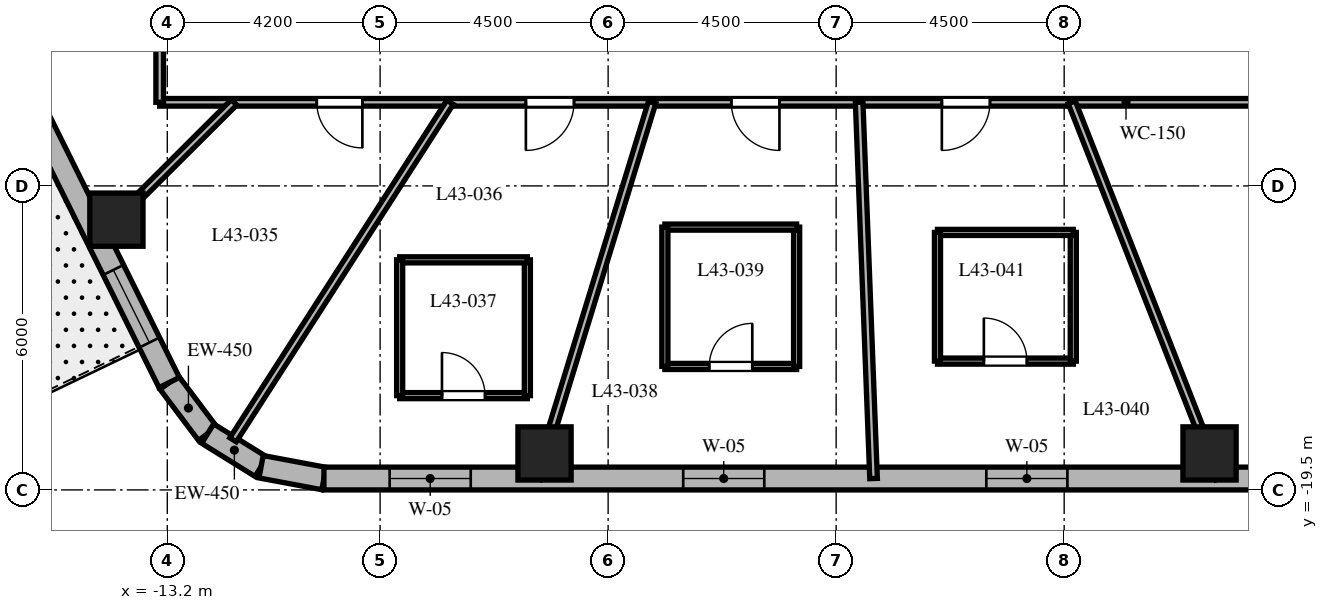
"""IFC4 building model, lengths in metres.
Left out: names, types, materials, properties, quantities, classifications, styles, units other than length and angle.
Written with IfcOpenShell. Run it as: python <this file> out.ifc"""

import sys

from ifc_helpers import new_model, si_unit, direction, frame, frame_2d, origin, origin_2d, place, context, subcontext, project, spatial, rectangle, extrude, element, fill, save


model = new_model("IFC4")
c1 = context("Model", 3, precision=1e-05, world=origin(), true_north=direction((0.0, 1.0)))
c2 = subcontext(c1, "Body", "Model", "MODEL_VIEW")
j1 = project(units=[si_unit("LENGTHUNIT", "METRE"), si_unit("PLANEANGLEUNIT", "RADIAN")], contexts=[c1])
p1 = place(None, origin())
s1 = spatial("IfcSite", under=j1, at=p1, CompositionType="ELEMENT")
p2 = place(p1, origin())
s2 = spatial("IfcBuilding", under=s1, at=p2, CompositionType="ELEMENT")
p3 = place(p2, frame((0.0, 0.0, 175.6)))
s3 = spatial("IfcBuildingStorey", under=s2, at=p3, CompositionType="ELEMENT", Elevation=175.6)
for number, where, z_axis, x_axis in (
    (1, (-5.755, -18.78, 0.0), (0.0, 0.0, 1.0), (1.0, 0.0, 0.0)),
    (2, (7.369, -18.78, 0.0), (0.0, 0.0, 1.0), (1.0, 0.0, 0.0)),
    (3, (-14.204, -14.166, 0.0), (0.0, 0.0, 1.0), (1.0, 0.0, 0.0)),
):
    element("IfcColumn", number, at=place(p3, frame(where, z_axis=z_axis, x_axis=x_axis)), inside=s3, PredefinedType="COLUMN", context=c2, shape_type="SweptSolid", body=[
        extrude(rectangle(XDim=1.05, YDim=1.05, at=origin_2d()), origin(), (0.0, 0.0, 1.0), 3.7),
    ])
p4 = place(p3, frame((-13.162, -17.381, 0.0), z_axis=(0.0, 0.0, 1.0), x_axis=(0.601515770517, -0.798860925205, 0.0)))
e4 = element("IfcWall", 4, at=p4, inside=s3, PredefinedType="SOLIDWALL", context=c2, shape_type="SweptSolid", body=[
    extrude(rectangle(XDim=1.262, YDim=0.45, at=frame_2d((0.631, 0.0))), origin(), (0.0, 0.0, 1.0), 3.4),
])
p5 = place(p3, frame((-12.403, -18.389, 0.0), z_axis=(0.0, 0.0, 1.0), x_axis=(0.849795170926, -0.527113049991, 0.0)))
e5 = element("IfcWall", 5, at=p5, inside=s3, PredefinedType="SOLIDWALL", context=c2, shape_type="SweptSolid", body=[
    extrude(rectangle(XDim=1.241, YDim=0.45, at=frame_2d((0.62, 0.0))), origin(), (0.0, 0.0, 1.0), 3.4),
])
p6 = place(p3, frame((-11.349, -19.043, 0.0), z_axis=(0.0, 0.0, 1.0), x_axis=(0.982931267051, -0.183973161772, 0.0)))
e6 = element("IfcWall", 6, at=p6, inside=s3, PredefinedType="SOLIDWALL", context=c2, shape_type="SweptSolid", body=[
    extrude(rectangle(XDim=1.262, YDim=0.45, at=frame_2d((0.631, 0.0))), origin(), (0.0, 0.0, 1.0), 3.4),
])
p7 = place(p3, frame((-10.108, -19.275, 0.0), z_axis=(0.0, 0.0, 1.0), x_axis=(1.0, 0.0, 0.0)))
e7 = element("IfcWall", 7, at=p7, inside=s3, PredefinedType="SOLIDWALL", context=c2, shape_type="SweptSolid", body=[
    extrude(rectangle(XDim=21.829, YDim=0.45, at=frame_2d((10.915, 0.0))), origin(), (0.0, 0.0, 1.0), 3.4),
])
p8 = place(p7, frame((1.297, 0.0, 0.8)))
e8 = element("IfcOpeningElement", 8, at=p8, cuts=e7, PredefinedType="OPENING", context=c2, shape_type="SweptSolid", body=[
    extrude(rectangle(XDim=1.6, YDim=1.75, at=frame_2d((0.8, 0.875))), frame((0.0, 0.235, 0.0), z_axis=(0.0, -1.0, 0.0), x_axis=(1.0, 0.0, 0.0)), (0.0, 0.0, 1.0), 0.47),
])
p9 = place(p7, frame((7.09, 0.0, 0.8)))
e9 = element("IfcOpeningElement", 9, at=p9, cuts=e7, PredefinedType="OPENING", context=c2, shape_type="SweptSolid", body=[
    extrude(rectangle(XDim=1.6, YDim=1.75, at=frame_2d((0.8, 0.875))), frame((0.0, 0.235, 0.0), z_axis=(0.0, -1.0, 0.0), x_axis=(1.0, 0.0, 0.0)), (0.0, 0.0, 1.0), 0.47),
])
p10 = place(p7, frame((13.072, 0.0, 0.8)))
e10 = element("IfcOpeningElement", 10, at=p10, cuts=e7, PredefinedType="OPENING", context=c2, shape_type="SweptSolid", body=[
    extrude(rectangle(XDim=1.6, YDim=1.75, at=frame_2d((0.8, 0.875))), frame((0.0, 0.235, 0.0), z_axis=(0.0, -1.0, 0.0), x_axis=(1.0, 0.0, 0.0)), (0.0, 0.0, 1.0), 0.47),
])
p11 = place(p7, frame((18.933, 0.0, 0.8)))
e11 = element("IfcOpeningElement", 11, at=p11, cuts=e7, PredefinedType="OPENING", context=c2, shape_type="SweptSolid", body=[
    extrude(rectangle(XDim=1.6, YDim=1.75, at=frame_2d((0.8, 0.875))), frame((0.0, 0.235, 0.0), z_axis=(0.0, -1.0, 0.0), x_axis=(1.0, 0.0, 0.0)), (0.0, 0.0, 1.0), 0.47),
])
p12 = place(p3, frame((-20.618, -2.344, 0.0), z_axis=(0.0, 0.0, 1.0), x_axis=(0.444243691097, -0.895905990002, 0.0)))
e12 = element("IfcWall", 12, at=p12, inside=s3, PredefinedType="SOLIDWALL", context=c2, shape_type="SweptSolid", body=[
    extrude(rectangle(XDim=16.784, YDim=0.45, at=frame_2d((8.392, 0.0))), origin(), (0.0, 0.0, 1.0), 3.4),
])
p13 = place(p12, frame((4.535, 0.0, 0.0)))
e13 = element("IfcOpeningElement", 13, at=p13, cuts=e12, PredefinedType="OPENING", context=c2, shape_type="SweptSolid", body=[
    extrude(rectangle(XDim=0.95, YDim=2.15, at=frame_2d((0.475, 1.075))), frame((0.0, 0.235, 0.0), z_axis=(0.0, -1.0, 0.0), x_axis=(1.0, 0.0, 0.0)), (0.0, 0.0, 1.0), 0.47),
])
p14 = place(p12, frame((0.931, 0.0, 0.8)))
e14 = element("IfcOpeningElement", 14, at=p14, cuts=e12, PredefinedType="OPENING", context=c2, shape_type="SweptSolid", body=[
    extrude(rectangle(XDim=1.6, YDim=1.75, at=frame_2d((0.8, 0.875))), frame((0.0, 0.235, 0.0), z_axis=(0.0, -1.0, 0.0), x_axis=(1.0, 0.0, 0.0)), (0.0, 0.0, 1.0), 0.47),
])
p15 = place(p12, frame((7.642, 0.0, 0.8)))
e15 = element("IfcOpeningElement", 15, at=p15, cuts=e12, PredefinedType="OPENING", context=c2, shape_type="SweptSolid", body=[
    extrude(rectangle(XDim=1.6, YDim=1.75, at=frame_2d((0.8, 0.875))), frame((0.0, 0.235, 0.0), z_axis=(0.0, -1.0, 0.0), x_axis=(1.0, 0.0, 0.0)), (0.0, 0.0, 1.0), 0.47),
])
p16 = place(p12, frame((14.303, 0.0, 0.8)))
e16 = element("IfcOpeningElement", 16, at=p16, cuts=e12, PredefinedType="OPENING", context=c2, shape_type="SweptSolid", body=[
    extrude(rectangle(XDim=1.6, YDim=1.75, at=frame_2d((0.8, 0.875))), frame((0.0, 0.235, 0.0), z_axis=(0.0, -1.0, 0.0), x_axis=(1.0, 0.0, 0.0)), (0.0, 0.0, 1.0), 0.47),
])
p17 = place(p3, frame((13.35, -11.85, 0.0), z_axis=(0.0, 0.0, 1.0), x_axis=(-1.0, 0.0, 0.0)))
e17 = element("IfcWall", 17, at=p17, inside=s3, PredefinedType="PARTITIONING", context=c2, shape_type="SweptSolid", body=[
    extrude(rectangle(XDim=26.7, YDim=0.15, at=frame_2d((13.35, 0.0))), origin(), (0.0, 0.0, 1.0), 2.84),
])
p18 = place(p17, frame((22.7, 0.0, 0.0)))
e18 = element("IfcOpeningElement", 18, at=p18, cuts=e17, PredefinedType="OPENING", context=c2, shape_type="SweptSolid", body=[
    extrude(rectangle(XDim=0.9, YDim=2.03, at=frame_2d((0.45, 1.015))), frame((0.0, 0.085, 0.0), z_axis=(0.0, -1.0, 0.0), x_axis=(1.0, 0.0, 0.0)), (0.0, 0.0, 1.0), 0.17),
])
p19 = place(p17, frame((18.523, 0.0, 0.0)))
e19 = element("IfcOpeningElement", 19, at=p19, cuts=e17, PredefinedType="OPENING", context=c2, shape_type="SweptSolid", body=[
    extrude(rectangle(XDim=0.95, YDim=2.03, at=frame_2d((0.475, 1.015))), frame((0.0, 0.085, 0.0), z_axis=(0.0, -1.0, 0.0), x_axis=(1.0, 0.0, 0.0)), (0.0, 0.0, 1.0), 0.17),
])
p20 = place(p17, frame((14.469, 0.0, 0.0)))
e20 = element("IfcOpeningElement", 20, at=p20, cuts=e17, PredefinedType="OPENING", context=c2, shape_type="SweptSolid", body=[
    extrude(rectangle(XDim=0.95, YDim=2.03, at=frame_2d((0.475, 1.015))), frame((0.0, 0.085, 0.0), z_axis=(0.0, -1.0, 0.0), x_axis=(1.0, 0.0, 0.0)), (0.0, 0.0, 1.0), 0.17),
])
p21 = place(p17, frame((10.314, 0.0, 0.0)))
e21 = element("IfcOpeningElement", 21, at=p21, cuts=e17, PredefinedType="OPENING", context=c2, shape_type="SweptSolid", body=[
    extrude(rectangle(XDim=0.95, YDim=2.03, at=frame_2d((0.475, 1.015))), frame((0.0, 0.085, 0.0), z_axis=(0.0, -1.0, 0.0), x_axis=(1.0, 0.0, 0.0)), (0.0, 0.0, 1.0), 0.17),
])
p22 = place(p17, frame((3.995, 0.0, 0.0)))
e22 = element("IfcOpeningElement", 22, at=p22, cuts=e17, PredefinedType="OPENING", context=c2, shape_type="SweptSolid", body=[
    extrude(rectangle(XDim=0.95, YDim=2.03, at=frame_2d((0.475, 1.015))), frame((0.0, 0.085, 0.0), z_axis=(0.0, -1.0, 0.0), x_axis=(1.0, 0.0, 0.0)), (0.0, 0.0, 1.0), 0.17),
])
p23 = place(p3, frame((-13.35, -11.85, 0.0), z_axis=(0.0, 0.0, 1.0), x_axis=(0.0, 1.0, 0.0)))
e23 = element("IfcWall", 23, at=p23, inside=s3, PredefinedType="PARTITIONING", context=c2, shape_type="SweptSolid", body=[
    extrude(rectangle(XDim=23.7, YDim=0.15, at=frame_2d((11.85, 0.0))), origin(), (0.0, 0.0, 1.0), 2.84),
])
p24 = place(p23, frame((18.389, 0.0, 0.0)))
e24 = element("IfcOpeningElement", 24, at=p24, cuts=e23, PredefinedType="OPENING", context=c2, shape_type="SweptSolid", body=[
    extrude(rectangle(XDim=0.95, YDim=2.03, at=frame_2d((0.475, 1.015))), frame((0.0, 0.085, 0.0), z_axis=(0.0, -1.0, 0.0), x_axis=(1.0, 0.0, 0.0)), (0.0, 0.0, 1.0), 0.17),
])
p25 = place(p23, frame((12.315, 0.0, 0.0)))
e25 = element("IfcOpeningElement", 25, at=p25, cuts=e23, PredefinedType="OPENING", context=c2, shape_type="SweptSolid", body=[
    extrude(rectangle(XDim=0.9, YDim=2.03, at=frame_2d((0.45, 1.015))), frame((0.0, 0.085, 0.0), z_axis=(0.0, -1.0, 0.0), x_axis=(1.0, 0.0, 0.0)), (0.0, 0.0, 1.0), 0.17),
])
p26 = place(p23, frame((9.27, 0.0, 0.0)))
e26 = element("IfcOpeningElement", 26, at=p26, cuts=e23, PredefinedType="OPENING", context=c2, shape_type="SweptSolid", body=[
    extrude(rectangle(XDim=0.9, YDim=2.03, at=frame_2d((0.45, 1.015))), frame((0.0, 0.085, 0.0), z_axis=(0.0, -1.0, 0.0), x_axis=(1.0, 0.0, 0.0)), (0.0, 0.0, 1.0), 0.17),
])
p27 = place(p23, frame((3.765, 0.0, 0.0)))
e27 = element("IfcOpeningElement", 27, at=p27, cuts=e23, PredefinedType="OPENING", context=c2, shape_type="SweptSolid", body=[
    extrude(rectangle(XDim=0.9, YDim=2.03, at=frame_2d((0.45, 1.015))), frame((0.0, 0.085, 0.0), z_axis=(0.0, -1.0, 0.0), x_axis=(1.0, 0.0, 0.0)), (0.0, 0.0, 1.0), 0.17),
])
p28 = place(p3, frame((-11.882, -11.85, 0.0), z_axis=(0.0, 0.0, 1.0), x_axis=(-0.708037373639, -0.706174962407, 0.0)))
e28 = element("IfcWall", 28, at=p28, inside=s3, PredefinedType="PARTITIONING", context=c2, shape_type="SweptSolid", body=[
    extrude(rectangle(XDim=3.802, YDim=0.15, at=frame_2d((1.901, 0.0))), origin(), (0.0, 0.0, 1.0), 2.64),
])
p29 = place(p3, frame((-7.619, -11.85, 0.0), z_axis=(0.0, 0.0, 1.0), x_axis=(-0.540829263478, -0.841132396098, 0.0)))
e29 = element("IfcWall", 29, at=p29, inside=s3, PredefinedType="PARTITIONING", context=c2, shape_type="SweptSolid", body=[
    extrude(rectangle(XDim=7.919, YDim=0.15, at=frame_2d((3.959, 0.0))), origin(), (0.0, 0.0, 1.0), 2.64),
])
p30 = place(p3, frame((-3.631, -11.85, 0.0), z_axis=(0.0, 0.0, 1.0), x_axis=(-0.293007573338, -0.956110120209, 0.0)))
e30 = element("IfcWall", 30, at=p30, inside=s3, PredefinedType="PARTITIONING", context=c2, shape_type="SweptSolid", body=[
    extrude(rectangle(XDim=7.766, YDim=0.15, at=frame_2d((3.883, 0.0))), origin(), (0.0, 0.0, 1.0), 2.64),
])
p31 = place(p3, frame((0.454, -11.85, 0.0), z_axis=(0.0, 0.0, 1.0), x_axis=(0.038279171143, -0.999267083945, 0.0)))
e31 = element("IfcWall", 31, at=p31, inside=s3, PredefinedType="PARTITIONING", context=c2, shape_type="SweptSolid", body=[
    extrude(rectangle(XDim=7.43, YDim=0.15, at=frame_2d((3.715, 0.0))), origin(), (0.0, 0.0, 1.0), 2.64),
])
p32 = place(p3, frame((4.65, -11.85, 0.0), z_axis=(0.0, 0.0, 1.0), x_axis=(0.365265947993, -0.930903210456, 0.0)))
e32 = element("IfcWall", 32, at=p32, inside=s3, PredefinedType="PARTITIONING", context=c2, shape_type="SweptSolid", body=[
    extrude(rectangle(XDim=7.976, YDim=0.15, at=frame_2d((3.988, 0.0))), origin(), (0.0, 0.0, 1.0), 2.64),
])
p33 = place(p3, frame((-8.614, -17.639, 0.0), z_axis=(0.0, 0.0, 1.0), x_axis=(1.0, 0.0, 0.0)))
e33 = element("IfcWall", 33, at=p33, inside=s3, PredefinedType="PARTITIONING", context=c2, shape_type="SweptSolid", body=[
    extrude(rectangle(XDim=2.52, YDim=0.12, at=frame_2d((1.26, 0.0))), origin(), (0.0, 0.0, 1.0), 2.64),
])
p34 = place(p33, frame((0.835, 0.0, 0.0)))
e34 = element("IfcOpeningElement", 34, at=p34, cuts=e33, PredefinedType="OPENING", context=c2, shape_type="SweptSolid", body=[
    extrude(rectangle(XDim=0.85, YDim=2.03, at=frame_2d((0.425, 1.015))), frame((0.0, 0.07, 0.0), z_axis=(0.0, -1.0, 0.0), x_axis=(1.0, 0.0, 0.0)), (0.0, 0.0, 1.0), 0.14),
])
p35 = place(p3, frame((-6.094, -17.639, 0.0), z_axis=(0.0, 0.0, 1.0), x_axis=(0.0, 1.0, 0.0)))
e35 = element("IfcWall", 35, at=p35, inside=s3, PredefinedType="PARTITIONING", context=c2, shape_type="SweptSolid", body=[
    extrude(rectangle(XDim=2.68, YDim=0.12, at=frame_2d((1.34, 0.0))), origin(), (0.0, 0.0, 1.0), 3.4),
])
p36 = place(p3, frame((-6.094, -14.959, 0.0), z_axis=(0.0, 0.0, 1.0), x_axis=(-1.0, 0.0, 0.0)))
e36 = element("IfcWall", 36, at=p36, inside=s3, PredefinedType="PARTITIONING", context=c2, shape_type="SweptSolid", body=[
    extrude(rectangle(XDim=2.52, YDim=0.12, at=frame_2d((1.26, 0.0))), origin(), (0.0, 0.0, 1.0), 3.4),
])
p37 = place(p3, frame((-8.614, -14.959, 0.0), z_axis=(0.0, 0.0, 1.0), x_axis=(0.0, -1.0, 0.0)))
e37 = element("IfcWall", 37, at=p37, inside=s3, PredefinedType="PARTITIONING", context=c2, shape_type="SweptSolid", body=[
    extrude(rectangle(XDim=2.68, YDim=0.12, at=frame_2d((1.34, 0.0))), origin(), (0.0, 0.0, 1.0), 2.64),
])
p38 = place(p3, frame((-3.38, -17.063, 0.0), z_axis=(0.0, 0.0, 1.0), x_axis=(1.0, 0.0, 0.0)))
e38 = element("IfcWall", 38, at=p38, inside=s3, PredefinedType="PARTITIONING", context=c2, shape_type="SweptSolid", body=[
    extrude(rectangle(XDim=2.6, YDim=0.12, at=frame_2d((1.3, 0.0))), origin(), (0.0, 0.0, 1.0), 3.4),
])
p39 = place(p38, frame((0.875, 0.0, 0.0)))
e39 = element("IfcOpeningElement", 39, at=p39, cuts=e38, PredefinedType="OPENING", context=c2, shape_type="SweptSolid", body=[
    extrude(rectangle(XDim=0.85, YDim=2.03, at=frame_2d((0.425, 1.015))), frame((0.0, 0.07, 0.0), z_axis=(0.0, -1.0, 0.0), x_axis=(1.0, 0.0, 0.0)), (0.0, 0.0, 1.0), 0.14),
])
p40 = place(p3, frame((-0.78, -17.063, 0.0), z_axis=(0.0, 0.0, 1.0), x_axis=(0.0, 1.0, 0.0)))
e40 = element("IfcWall", 40, at=p40, inside=s3, PredefinedType="PARTITIONING", context=c2, shape_type="SweptSolid", body=[
    extrude(rectangle(XDim=2.75, YDim=0.12, at=frame_2d((1.375, 0.0))), origin(), (0.0, 0.0, 1.0), 2.84),
])
p41 = place(p3, frame((-0.78, -14.313, 0.0), z_axis=(0.0, 0.0, 1.0), x_axis=(-1.0, 0.0, 0.0)))
e41 = element("IfcWall", 41, at=p41, inside=s3, PredefinedType="PARTITIONING", context=c2, shape_type="SweptSolid", body=[
    extrude(rectangle(XDim=2.6, YDim=0.12, at=frame_2d((1.3, 0.0))), origin(), (0.0, 0.0, 1.0), 3.4),
])
p42 = place(p3, frame((-3.38, -14.313, 0.0), z_axis=(0.0, 0.0, 1.0), x_axis=(0.0, -1.0, 0.0)))
e42 = element("IfcWall", 42, at=p42, inside=s3, PredefinedType="PARTITIONING", context=c2, shape_type="SweptSolid", body=[
    extrude(rectangle(XDim=2.75, YDim=0.12, at=frame_2d((1.375, 0.0))), origin(), (0.0, 0.0, 1.0), 2.84),
])
p43 = place(p3, frame((2.0, -16.958, 0.0), z_axis=(0.0, 0.0, 1.0), x_axis=(1.0, 0.0, 0.0)))
e43 = element("IfcWall", 43, at=p43, inside=s3, PredefinedType="PARTITIONING", context=c2, shape_type="SweptSolid", body=[
    extrude(rectangle(XDim=2.68, YDim=0.12, at=frame_2d((1.34, 0.0))), origin(), (0.0, 0.0, 1.0), 3.4),
])
p44 = place(p43, frame((0.915, 0.0, 0.0)))
e44 = element("IfcOpeningElement", 44, at=p44, cuts=e43, PredefinedType="OPENING", context=c2, shape_type="SweptSolid", body=[
    extrude(rectangle(XDim=0.85, YDim=2.03, at=frame_2d((0.425, 1.015))), frame((0.0, 0.07, 0.0), z_axis=(0.0, -1.0, 0.0), x_axis=(1.0, 0.0, 0.0)), (0.0, 0.0, 1.0), 0.14),
])
p45 = place(p3, frame((4.68, -16.958, 0.0), z_axis=(0.0, 0.0, 1.0), x_axis=(0.0, 1.0, 0.0)))
e45 = element("IfcWall", 45, at=p45, inside=s3, PredefinedType="PARTITIONING", context=c2, shape_type="SweptSolid", body=[
    extrude(rectangle(XDim=2.54, YDim=0.12, at=frame_2d((1.27, 0.0))), origin(), (0.0, 0.0, 1.0), 2.84),
])
p46 = place(p3, frame((4.68, -14.418, 0.0), z_axis=(0.0, 0.0, 1.0), x_axis=(-1.0, 0.0, 0.0)))
e46 = element("IfcWall", 46, at=p46, inside=s3, PredefinedType="PARTITIONING", context=c2, shape_type="SweptSolid", body=[
    extrude(rectangle(XDim=2.68, YDim=0.12, at=frame_2d((1.34, 0.0))), origin(), (0.0, 0.0, 1.0), 3.4),
])
p47 = place(p3, frame((2.0, -14.418, 0.0), z_axis=(0.0, 0.0, 1.0), x_axis=(0.0, -1.0, 0.0)))
e47 = element("IfcWall", 47, at=p47, inside=s3, PredefinedType="PARTITIONING", context=c2, shape_type="SweptSolid", body=[
    extrude(rectangle(XDim=2.54, YDim=0.12, at=frame_2d((1.27, 0.0))), origin(), (0.0, 0.0, 1.0), 2.84),
])
p48 = place(p8, origin())
e48 = element("IfcWindow", 48, at=p48, inside=s3, PartitioningType="SINGLE_PANEL", PredefinedType="WINDOW", context=c2, shape_type="SweptSolid", body=[
    extrude(rectangle(XDim=1.6, YDim=1.75, at=frame_2d((0.8, 0.875))), frame((0.0, 0.03, 0.0), z_axis=(0.0, -1.0, 0.0), x_axis=(1.0, 0.0, 0.0)), (0.0, 0.0, 1.0), 0.06),
])
fill(e8, e48)
p49 = place(p9, origin())
e49 = element("IfcWindow", 49, at=p49, inside=s3, PartitioningType="SINGLE_PANEL", PredefinedType="WINDOW", context=c2, shape_type="SweptSolid", body=[
    extrude(rectangle(XDim=1.6, YDim=1.75, at=frame_2d((0.8, 0.875))), frame((0.0, 0.03, 0.0), z_axis=(0.0, -1.0, 0.0), x_axis=(1.0, 0.0, 0.0)), (0.0, 0.0, 1.0), 0.06),
])
fill(e9, e49)
p50 = place(p10, origin())
e50 = element("IfcWindow", 50, at=p50, inside=s3, PartitioningType="SINGLE_PANEL", PredefinedType="WINDOW", context=c2, shape_type="SweptSolid", body=[
    extrude(rectangle(XDim=1.6, YDim=1.75, at=frame_2d((0.8, 0.875))), frame((0.0, 0.03, 0.0), z_axis=(0.0, -1.0, 0.0), x_axis=(1.0, 0.0, 0.0)), (0.0, 0.0, 1.0), 0.06),
])
fill(e10, e50)
p51 = place(p16, origin())
e51 = element("IfcWindow", 51, at=p51, inside=s3, PartitioningType="SINGLE_PANEL", PredefinedType="WINDOW", context=c2, shape_type="SweptSolid", body=[
    extrude(rectangle(XDim=1.6, YDim=1.75, at=frame_2d((0.8, 0.875))), frame((0.0, 0.03, 0.0), z_axis=(0.0, -1.0, 0.0), x_axis=(1.0, 0.0, 0.0)), (0.0, 0.0, 1.0), 0.06),
])
fill(e16, e51)
p52 = place(p18, origin())
e52 = element("IfcDoor", 52, at=p52, inside=s3, OperationType="SINGLE_SWING_LEFT", PredefinedType="DOOR", context=c2, shape_type="SweptSolid", body=[
    extrude(rectangle(XDim=0.9, YDim=2.03, at=frame_2d((0.45, 1.015))), frame((0.0, 0.025, 0.0), z_axis=(0.0, -1.0, 0.0), x_axis=(1.0, 0.0, 0.0)), (0.0, 0.0, 1.0), 0.05),
])
fill(e18, e52)
p53 = place(p19, origin())
e53 = element("IfcDoor", 53, at=p53, inside=s3, OperationType="SINGLE_SWING_RIGHT", PredefinedType="DOOR", context=c2, shape_type="SweptSolid", body=[
    extrude(rectangle(XDim=0.95, YDim=2.03, at=frame_2d((0.475, 1.015))), frame((0.0, 0.025, 0.0), z_axis=(0.0, -1.0, 0.0), x_axis=(1.0, 0.0, 0.0)), (0.0, 0.0, 1.0), 0.05),
])
fill(e19, e53)
p54 = place(p34, origin())
e54 = element("IfcDoor", 54, at=p54, inside=s3, OperationType="SINGLE_SWING_LEFT", PredefinedType="DOOR", context=c2, shape_type="SweptSolid", body=[
    extrude(rectangle(XDim=0.85, YDim=2.03, at=frame_2d((0.425, 1.015))), frame((0.0, 0.025, 0.0), z_axis=(0.0, -1.0, 0.0), x_axis=(1.0, 0.0, 0.0)), (0.0, 0.0, 1.0), 0.05),
])
fill(e34, e54)
p55 = place(p20, origin())
e55 = element("IfcDoor", 55, at=p55, inside=s3, OperationType="SINGLE_SWING_LEFT", PredefinedType="DOOR", context=c2, shape_type="SweptSolid", body=[
    extrude(rectangle(XDim=0.95, YDim=2.03, at=frame_2d((0.475, 1.015))), frame((0.0, 0.025, 0.0), z_axis=(0.0, -1.0, 0.0), x_axis=(1.0, 0.0, 0.0)), (0.0, 0.0, 1.0), 0.05),
])
fill(e20, e55)
p56 = place(p39, origin())
e56 = element("IfcDoor", 56, at=p56, inside=s3, OperationType="SINGLE_SWING_RIGHT", PredefinedType="DOOR", context=c2, shape_type="SweptSolid", body=[
    extrude(rectangle(XDim=0.85, YDim=2.03, at=frame_2d((0.425, 1.015))), frame((0.0, 0.025, 0.0), z_axis=(0.0, -1.0, 0.0), x_axis=(1.0, 0.0, 0.0)), (0.0, 0.0, 1.0), 0.05),
])
fill(e39, e56)
p57 = place(p21, origin())
e57 = element("IfcDoor", 57, at=p57, inside=s3, OperationType="SINGLE_SWING_RIGHT", PredefinedType="DOOR", context=c2, shape_type="SweptSolid", body=[
    extrude(rectangle(XDim=0.95, YDim=2.03, at=frame_2d((0.475, 1.015))), frame((0.0, 0.025, 0.0), z_axis=(0.0, -1.0, 0.0), x_axis=(1.0, 0.0, 0.0)), (0.0, 0.0, 1.0), 0.05),
])
fill(e21, e57)
p58 = place(p44, origin())
e58 = element("IfcDoor", 58, at=p58, inside=s3, OperationType="SINGLE_SWING_LEFT", PredefinedType="DOOR", context=c2, shape_type="SweptSolid", body=[
    extrude(rectangle(XDim=0.85, YDim=2.03, at=frame_2d((0.425, 1.015))), frame((0.0, 0.025, 0.0), z_axis=(0.0, -1.0, 0.0), x_axis=(1.0, 0.0, 0.0)), (0.0, 0.0, 1.0), 0.05),
])
fill(e44, e58)
save(model, sys.argv[1])
